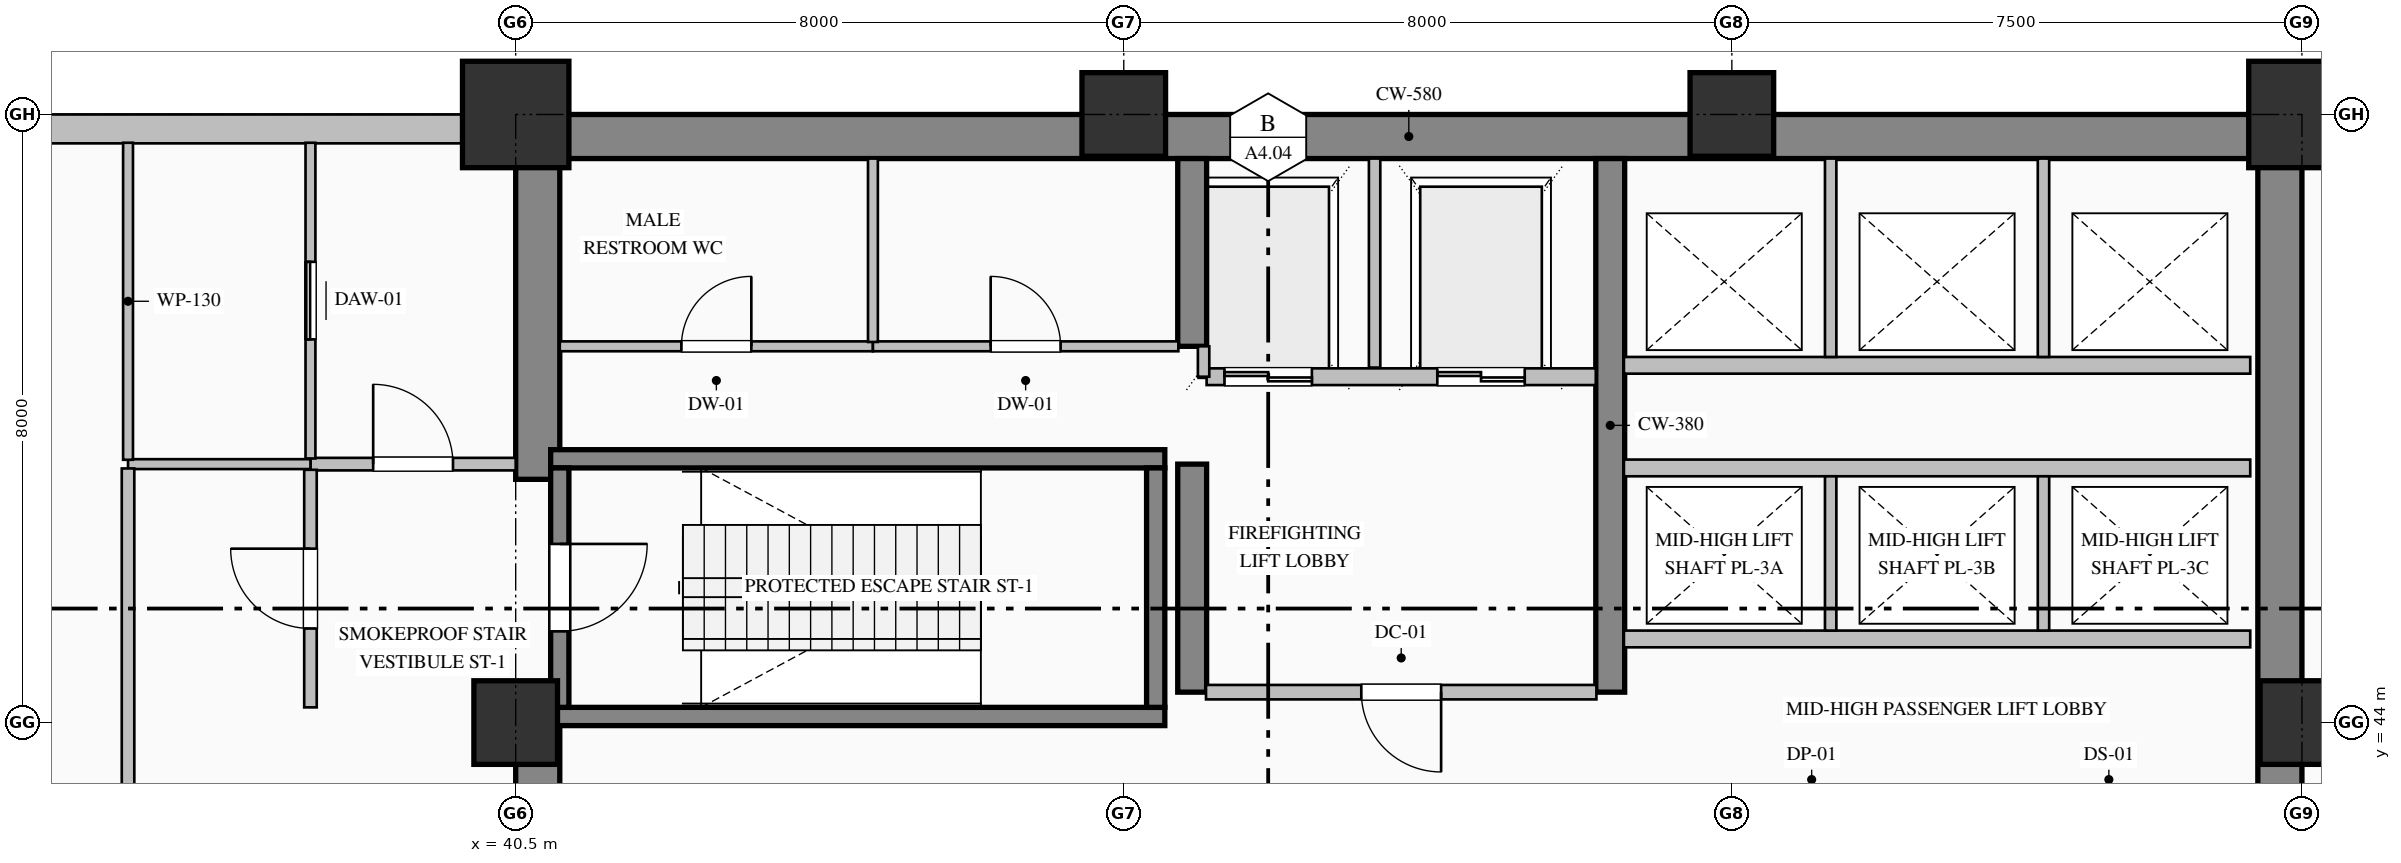
"""IFC4 building model, lengths in metres.
Left out: names, types, materials, properties, quantities, classifications, styles, units other than length and angle.
Written with IfcOpenShell. Run it as: python <this file> out.ifc"""

import sys

from ifc_helpers import new_model, si_unit, direction, frame, frame_2d, origin, origin_2d, place, context, subcontext, project, spatial, rectangle, hollow_rectangle, extrude, element, fill, save


model = new_model("IFC4")
c1 = context("Model", 3, precision=1e-05, world=origin(), true_north=direction((0.0, 1.0)))
c2 = subcontext(c1, "Body", "Model", "MODEL_VIEW")
j1 = project(units=[si_unit("LENGTHUNIT", "METRE"), si_unit("PLANEANGLEUNIT", "RADIAN")], contexts=[c1])
p1 = place(None, origin())
s1 = spatial("IfcSite", under=j1, at=p1, CompositionType="ELEMENT")
p2 = place(p1, origin())
s2 = spatial("IfcBuilding", under=s1, at=p2, CompositionType="ELEMENT")
p3 = place(p2, frame((0.0, 0.0, 17.4)))
s3 = spatial("IfcBuildingStorey", under=s2, at=p3, CompositionType="ELEMENT", Elevation=17.4)
p4 = place(p3, frame((40.5, 51.71, 0.0), z_axis=(0.0, 0.0, 1.0), x_axis=(1.0, 0.0, 0.0)))
e1 = element("IfcWall", 1, at=p4, inside=s3, PredefinedType="SHEAR", context=c2, shape_type="SweptSolid", body=[
    extrude(rectangle(XDim=23.5, YDim=0.58, at=frame_2d((11.75, 0.0))), origin(), (0.0, 0.0, 1.0), 5.14),
])
p5 = place(p3, frame((63.71, 36.32, 0.0), z_axis=(0.0, 0.0, 1.0), x_axis=(0.0, 1.0, 0.0)))
e2 = element("IfcWall", 2, at=p5, inside=s3, PredefinedType="SHEAR", context=c2, shape_type="SweptSolid", body=[
    extrude(rectangle(XDim=15.1, YDim=0.58, at=frame_2d((7.55, 0.0))), origin(), (0.0, 0.0, 1.0), 5.14),
])
p6 = place(p3, frame((40.79, 36.58, 0.0), z_axis=(0.0, 0.0, 1.0), x_axis=(0.0, 1.0, 0.0)))
e3 = element("IfcWall", 3, at=p6, inside=s3, PredefinedType="SHEAR", context=c2, shape_type="SweptSolid", body=[
    extrude(rectangle(XDim=7.82, YDim=0.58, at=frame_2d((3.91, 0.0))), origin(), (0.0, 0.0, 1.0), 5.14),
])
p7 = place(p3, frame((40.79, 47.2, 0.0), z_axis=(0.0, 0.0, 1.0), x_axis=(0.0, 1.0, 0.0)))
e4 = element("IfcWall", 4, at=p7, inside=s3, PredefinedType="SHEAR", context=c2, shape_type="SweptSolid", body=[
    extrude(rectangle(XDim=4.22, YDim=0.58, at=frame_2d((2.11, 0.0))), origin(), (0.0, 0.0, 1.0), 5.14),
])
p8 = place(p3, frame((49.4, 44.4, 0.0), z_axis=(0.0, 0.0, 1.0), x_axis=(0.0, 1.0, 0.0)))
e5 = element("IfcWall", 5, at=p8, inside=s3, PredefinedType="SHEAR", context=c2, shape_type="SweptSolid", body=[
    extrude(rectangle(XDim=3.0, YDim=0.38, at=frame_2d((1.5, 0.0))), origin(), (0.0, 0.0, 1.0), 5.14),
])
p9 = place(p3, frame((49.4, 48.95, 0.0), z_axis=(0.0, 0.0, 1.0), x_axis=(0.0, 1.0, 0.0)))
e6 = element("IfcWall", 6, at=p9, inside=s3, PredefinedType="SHEAR", context=c2, shape_type="SweptSolid", body=[
    extrude(rectangle(XDim=2.47, YDim=0.38, at=frame_2d((1.235, 0.0))), origin(), (0.0, 0.0, 1.0), 5.14),
])
p10 = place(p3, frame((54.9, 44.4, 0.0), z_axis=(0.0, 0.0, 1.0), x_axis=(0.0, 1.0, 0.0)))
e7 = element("IfcWall", 7, at=p10, inside=s3, PredefinedType="SHEAR", context=c2, shape_type="SweptSolid", body=[
    extrude(rectangle(XDim=7.02, YDim=0.38, at=frame_2d((3.51, 0.0))), origin(), (0.0, 0.0, 1.0), 5.14),
])
p11 = place(p3, frame((40.5, 44.0, 0.0), z_axis=(0.0, 0.0, 1.0), x_axis=(1.0, 0.0, 0.0)))
e8 = element("IfcColumn", 8, at=p11, inside=s3, PredefinedType="COLUMN", context=c2, shape_type="SweptSolid", body=[
    extrude(rectangle(XDim=1.1, YDim=1.1, at=origin_2d()), origin(), (0.0, 0.0, 1.0), 5.4),
])
p12 = place(p3, frame((40.5, 52.0, 0.0), z_axis=(0.0, 0.0, 1.0), x_axis=(1.0, 0.0, 0.0)))
e9 = element("IfcColumn", 9, at=p12, inside=s3, PredefinedType="COLUMN", context=c2, shape_type="SweptSolid", body=[
    extrude(hollow_rectangle(XDim=1.4, YDim=1.4, WallThickness=0.05, at=origin_2d()), origin(), (0.0, 0.0, 1.0), 5.4),
])
for number, where, z_axis, x_axis in (
    (10, (48.5, 52.0, 0.0), (0.0, 0.0, 1.0), (1.0, 0.0, 0.0)),
    (11, (56.5, 52.0, 0.0), (0.0, 0.0, 1.0), (1.0, 0.0, 0.0)),
):
    element("IfcColumn", number, at=place(p3, frame(where, z_axis=z_axis, x_axis=x_axis)), inside=s3, PredefinedType="COLUMN", context=c2, shape_type="SweptSolid", body=[
        extrude(hollow_rectangle(XDim=1.1, YDim=1.1, WallThickness=0.04, at=origin_2d()), origin(), (0.0, 0.0, 1.0), 5.4),
    ])
p13 = place(p3, frame((64.0, 44.0, 0.0), z_axis=(0.0, 0.0, 1.0), x_axis=(1.0, 0.0, 0.0)))
e12 = element("IfcColumn", 12, at=p13, inside=s3, PredefinedType="COLUMN", context=c2, shape_type="SweptSolid", body=[
    extrude(rectangle(XDim=1.1, YDim=1.1, at=origin_2d()), origin(), (0.0, 0.0, 1.0), 5.4),
])
p14 = place(p3, frame((64.0, 52.0, 0.0), z_axis=(0.0, 0.0, 1.0), x_axis=(1.0, 0.0, 0.0)))
e13 = element("IfcColumn", 13, at=p14, inside=s3, PredefinedType="COLUMN", context=c2, shape_type="SweptSolid", body=[
    extrude(hollow_rectangle(XDim=1.4, YDim=1.4, WallThickness=0.05, at=origin_2d()), origin(), (0.0, 0.0, 1.0), 5.4),
])
p15 = place(p3, frame((63.98, 51.81, 0.0), z_axis=(0.0, 0.0, 1.0), x_axis=(1.0, 0.0, 0.0)))
e14 = element("IfcWall", 14, at=p15, inside=s3, PredefinedType="SOLIDWALL", context=c2, shape_type="SweptSolid", body=[
    extrude(rectangle(XDim=4.02, YDim=0.38, at=frame_2d((2.01, 0.0))), origin(), (0.0, 0.0, 1.0), 5.14),
])
p16 = place(p3, frame((4.0, 51.81, 0.0), z_axis=(0.0, 0.0, 1.0), x_axis=(1.0, 0.0, 0.0)))
e15 = element("IfcWall", 15, at=p16, inside=s3, PredefinedType="SOLIDWALL", context=c2, shape_type="SweptSolid", body=[
    extrude(rectangle(XDim=36.52, YDim=0.38, at=frame_2d((18.26, 0.0))), origin(), (0.0, 0.0, 1.0), 4.64),
])
p17 = place(p16, frame((16.7, 0.0, 0.85)))
e16 = element("IfcOpeningElement", 16, at=p17, cuts=e15, PredefinedType="OPENING", context=c2, shape_type="SweptSolid", body=[
    extrude(rectangle(XDim=2.6, YDim=3.1, at=frame_2d((1.3, 1.55))), frame((0.0, 0.2, 0.0), z_axis=(0.0, -1.0, 0.0), x_axis=(1.0, 0.0, 0.0)), (0.0, 0.0, 1.0), 0.4),
])
p18 = place(p16, frame((24.1, 0.0, 0.9)))
e17 = element("IfcOpeningElement", 17, at=p18, cuts=e15, PredefinedType="OPENING", context=c2, shape_type="SweptSolid", body=[
    extrude(rectangle(XDim=2.2, YDim=2.65, at=frame_2d((1.1, 1.325))), frame((0.0, 0.2, 0.0), z_axis=(0.0, -1.0, 0.0), x_axis=(1.0, 0.0, 0.0)), (0.0, 0.0, 1.0), 0.4),
])
for number, where, z_axis, x_axis in (
    (18, (40.96, 47.47, 0.0), (0.0, 0.0, 1.0), (1.0, 0.0, 0.0)),
    (19, (49.04, 44.08, 0.0), (0.0, 0.0, 1.0), (-1.0, 0.0, 0.0)),
):
    element("IfcWall", number, at=place(p3, frame(where, z_axis=z_axis, x_axis=x_axis)), inside=s3, PredefinedType="SOLIDWALL", context=c2, shape_type="SweptSolid", body=[
        extrude(rectangle(XDim=8.08, YDim=0.24, at=frame_2d((4.04, 0.0))), origin(), (0.0, 0.0, 1.0), 5.4),
    ])
p19 = place(p3, frame((41.08, 47.35, 0.0), z_axis=(0.0, 0.0, 1.0), x_axis=(0.0, -1.0, 0.0)))
e20 = element("IfcWall", 20, at=p19, inside=s3, PredefinedType="SOLIDWALL", context=c2, shape_type="SweptSolid", body=[
    extrude(rectangle(XDim=3.15, YDim=0.24, at=frame_2d((1.575, 0.0))), origin(), (0.0, 0.0, 1.0), 5.4),
])
p20 = place(p19, frame((1.0, 0.0, 0.0)))
e21 = element("IfcOpeningElement", 21, at=p20, cuts=e20, PredefinedType="OPENING", context=c2, shape_type="SweptSolid", body=[
    extrude(rectangle(XDim=1.15, YDim=2.2, at=frame_2d((0.575, 1.1))), frame((0.0, 0.13, 0.0), z_axis=(0.0, -1.0, 0.0), x_axis=(1.0, 0.0, 0.0)), (0.0, 0.0, 1.0), 0.26),
])
p21 = place(p3, frame((48.92, 44.2, 0.0), z_axis=(0.0, 0.0, 1.0), x_axis=(0.0, 1.0, 0.0)))
e22 = element("IfcWall", 22, at=p21, inside=s3, PredefinedType="SOLIDWALL", context=c2, shape_type="SweptSolid", body=[
    extrude(rectangle(XDim=3.15, YDim=0.24, at=frame_2d((1.575, 0.0))), origin(), (0.0, 0.0, 1.0), 5.4),
])
p22 = place(p3, frame((54.71, 48.55, 0.0), z_axis=(0.0, 0.0, 1.0), x_axis=(-1.0, 0.0, 0.0)))
e23 = element("IfcWall", 23, at=p22, inside=s3, PredefinedType="PARTITIONING", context=c2, shape_type="SweptSolid", body=[
    extrude(rectangle(XDim=5.12, YDim=0.22, at=frame_2d((2.56, 0.0))), origin(), (0.0, 0.0, 1.0), 5.14),
])
p23 = place(p22, frame((3.735, 0.0, 0.0)))
e24 = element("IfcOpeningElement", 24, at=p23, cuts=e23, PredefinedType="OPENING", context=c2, shape_type="SweptSolid", body=[
    extrude(rectangle(XDim=1.15, YDim=2.2, at=frame_2d((0.575, 1.1))), frame((0.0, 0.12, 0.0), z_axis=(0.0, -1.0, 0.0), x_axis=(1.0, 0.0, 0.0)), (0.0, 0.0, 1.0), 0.24),
])
p24 = place(p22, frame((0.935, 0.0, 0.0)))
e25 = element("IfcOpeningElement", 25, at=p24, cuts=e23, PredefinedType="OPENING", context=c2, shape_type="SweptSolid", body=[
    extrude(rectangle(XDim=1.15, YDim=2.2, at=frame_2d((0.575, 1.1))), frame((0.0, 0.12, 0.0), z_axis=(0.0, -1.0, 0.0), x_axis=(1.0, 0.0, 0.0)), (0.0, 0.0, 1.0), 0.24),
])
p25 = place(p3, frame((51.8, 48.67, 0.0), z_axis=(0.0, 0.0, 1.0), x_axis=(0.0, 1.0, 0.0)))
e26 = element("IfcWall", 26, at=p25, inside=s3, PredefinedType="PARTITIONING", context=c2, shape_type="SweptSolid", body=[
    extrude(rectangle(XDim=2.75, YDim=0.15, at=frame_2d((1.375, 0.0))), origin(), (0.0, 0.0, 1.0), 5.14),
])
p26 = place(p3, frame((49.55, 48.55, 0.0), z_axis=(0.0, 0.0, 1.0), x_axis=(0.0, 1.0, 0.0)))
e27 = element("IfcWall", 27, at=p26, inside=s3, PredefinedType="PARTITIONING", context=c2, shape_type="SweptSolid", body=[
    extrude(rectangle(XDim=0.4, YDim=0.15, at=frame_2d((0.2, 0.0))), origin(), (0.0, 0.0, 1.0), 5.14),
])
for number, where, z_axis, x_axis in (
    (28, (63.32, 45.1, 0.0), (0.0, 0.0, 1.0), (-1.0, 0.0, 0.0)),
    (29, (55.08, 47.35, 0.0), (0.0, 0.0, 1.0), (1.0, 0.0, 0.0)),
):
    element("IfcWall", number, at=place(p3, frame(where, z_axis=z_axis, x_axis=x_axis)), inside=s3, PredefinedType="PARTITIONING", context=c2, shape_type="SweptSolid", body=[
        extrude(rectangle(XDim=8.24, YDim=0.22, at=frame_2d((4.12, 0.0))), origin(), (0.0, 0.0, 1.0), 5.14),
    ])
for number, where, z_axis, x_axis in (
    (30, (57.8, 45.21, 0.0), (0.0, 0.0, 1.0), (0.0, 1.0, 0.0)),
    (31, (60.6, 45.21, 0.0), (0.0, 0.0, 1.0), (0.0, 1.0, 0.0)),
):
    element("IfcWall", number, at=place(p3, frame(where, z_axis=z_axis, x_axis=x_axis)), inside=s3, PredefinedType="PARTITIONING", context=c2, shape_type="SweptSolid", body=[
        extrude(rectangle(XDim=2.03, YDim=0.15, at=frame_2d((1.015, 0.0))), origin(), (0.0, 0.0, 1.0), 5.14),
    ])
p27 = place(p3, frame((63.32, 48.7, 0.0), z_axis=(0.0, 0.0, 1.0), x_axis=(-1.0, 0.0, 0.0)))
e32 = element("IfcWall", 32, at=p27, inside=s3, PredefinedType="PARTITIONING", context=c2, shape_type="SweptSolid", body=[
    extrude(rectangle(XDim=8.24, YDim=0.22, at=frame_2d((4.12, 0.0))), origin(), (0.0, 0.0, 1.0), 5.14),
])
for number, where, z_axis, x_axis in (
    (33, (57.8, 48.81, 0.0), (0.0, 0.0, 1.0), (0.0, 1.0, 0.0)),
    (34, (60.6, 48.81, 0.0), (0.0, 0.0, 1.0), (0.0, 1.0, 0.0)),
):
    element("IfcWall", number, at=place(p3, frame(where, z_axis=z_axis, x_axis=x_axis)), inside=s3, PredefinedType="PARTITIONING", context=c2, shape_type="SweptSolid", body=[
        extrude(rectangle(XDim=2.61, YDim=0.15, at=frame_2d((1.305, 0.0))), origin(), (0.0, 0.0, 1.0), 5.14),
    ])
p28 = place(p3, frame((37.8, 47.4, 0.0), z_axis=(0.0, 0.0, 1.0), x_axis=(1.0, 0.0, 0.0)))
e35 = element("IfcWall", 35, at=p28, inside=s3, PredefinedType="PARTITIONING", context=c2, shape_type="SweptSolid", body=[
    extrude(rectangle(XDim=2.7, YDim=0.165, at=frame_2d((1.35, 0.0))), origin(), (0.0, 0.0, 1.0), 5.14),
])
p29 = place(p28, frame((0.825, 0.0, 0.0)))
e36 = element("IfcOpeningElement", 36, at=p29, cuts=e35, PredefinedType="OPENING", context=c2, shape_type="SweptSolid", body=[
    extrude(rectangle(XDim=1.05, YDim=2.15, at=frame_2d((0.525, 1.075))), frame((0.0, 0.093, 0.0), z_axis=(0.0, -1.0, 0.0), x_axis=(1.0, 0.0, 0.0)), (0.0, 0.0, 1.0), 0.185),
])
p30 = place(p3, frame((37.8, 44.2, 0.0), z_axis=(0.0, 0.0, 1.0), x_axis=(0.0, 1.0, 0.0)))
e37 = element("IfcWall", 37, at=p30, inside=s3, PredefinedType="PARTITIONING", context=c2, shape_type="SweptSolid", body=[
    extrude(rectangle(XDim=3.125, YDim=0.165, at=frame_2d((1.563, 0.0))), origin(), (0.0, 0.0, 1.0), 5.14),
])
p31 = place(p30, frame((1.038, 0.0, 0.0)))
e38 = element("IfcOpeningElement", 38, at=p31, cuts=e37, PredefinedType="OPENING", context=c2, shape_type="SweptSolid", body=[
    extrude(rectangle(XDim=1.05, YDim=2.15, at=frame_2d((0.525, 1.075))), frame((0.0, 0.093, 0.0), z_axis=(0.0, -1.0, 0.0), x_axis=(1.0, 0.0, 0.0)), (0.0, 0.0, 1.0), 0.185),
])
p32 = place(p3, frame((37.8, 47.475, 0.0), z_axis=(0.0, 0.0, 1.0), x_axis=(0.0, 1.0, 0.0)))
e39 = element("IfcWall", 39, at=p32, inside=s3, PredefinedType="PARTITIONING", context=c2, shape_type="SweptSolid", body=[
    extrude(rectangle(XDim=4.153, YDim=0.13, at=frame_2d((2.077, 0.0))), origin(), (0.0, 0.0, 1.0), 5.14),
])
p33 = place(p32, frame((1.567, 0.0, 0.0)))
e40 = element("IfcOpeningElement", 40, at=p33, cuts=e39, PredefinedType="OPENING", context=c2, shape_type="SweptSolid", body=[
    extrude(rectangle(XDim=1.02, YDim=2.15, at=frame_2d((0.51, 1.075))), frame((0.0, 0.075, 0.0), z_axis=(0.0, -1.0, 0.0), x_axis=(1.0, 0.0, 0.0)), (0.0, 0.0, 1.0), 0.15),
])
p34 = place(p3, frame((37.8, 47.4, 0.0), z_axis=(0.0, 0.0, 1.0), x_axis=(-1.0, 0.0, 0.0)))
e41 = element("IfcWall", 41, at=p34, inside=s3, PredefinedType="PARTITIONING", context=c2, shape_type="SweptSolid", body=[
    extrude(rectangle(XDim=2.4, YDim=0.13, at=frame_2d((1.2, 0.0))), origin(), (0.0, 0.0, 1.0), 5.14),
])
p35 = place(p3, frame((35.4, 47.457, 0.0), z_axis=(0.0, 0.0, 1.0), x_axis=(0.0, 1.0, 0.0)))
e42 = element("IfcWall", 42, at=p35, inside=s3, PredefinedType="PARTITIONING", context=c2, shape_type="SweptSolid", body=[
    extrude(rectangle(XDim=4.171, YDim=0.13, at=frame_2d((2.085, 0.0))), origin(), (0.0, 0.0, 1.0), 5.14),
])
p36 = place(p3, frame((41.08, 48.95, 0.0), z_axis=(0.0, 0.0, 1.0), x_axis=(1.0, 0.0, 0.0)))
e43 = element("IfcWall", 43, at=p36, inside=s3, PredefinedType="PARTITIONING", context=c2, shape_type="SweptSolid", body=[
    extrude(rectangle(XDim=4.12, YDim=0.13, at=frame_2d((2.06, 0.0))), origin(), (0.0, 0.0, 1.0), 5.14),
])
p37 = place(p36, frame((1.6, 0.0, 0.0)))
e44 = element("IfcOpeningElement", 44, at=p37, cuts=e43, PredefinedType="OPENING", context=c2, shape_type="SweptSolid", body=[
    extrude(rectangle(XDim=0.92, YDim=2.15, at=frame_2d((0.46, 1.075))), frame((0.0, 0.075, 0.0), z_axis=(0.0, -1.0, 0.0), x_axis=(1.0, 0.0, 0.0)), (0.0, 0.0, 1.0), 0.15),
])
p38 = place(p3, frame((45.2, 48.95, 0.0), z_axis=(0.0, 0.0, 1.0), x_axis=(1.0, 0.0, 0.0)))
e45 = element("IfcWall", 45, at=p38, inside=s3, PredefinedType="PARTITIONING", context=c2, shape_type="SweptSolid", body=[
    extrude(rectangle(XDim=4.018, YDim=0.13, at=frame_2d((2.009, 0.0))), origin(), (0.0, 0.0, 1.0), 5.14),
])
p39 = place(p38, frame((1.549, 0.0, 0.0)))
e46 = element("IfcOpeningElement", 46, at=p39, cuts=e45, PredefinedType="OPENING", context=c2, shape_type="SweptSolid", body=[
    extrude(rectangle(XDim=0.92, YDim=2.15, at=frame_2d((0.46, 1.075))), frame((0.0, 0.075, 0.0), z_axis=(0.0, -1.0, 0.0), x_axis=(1.0, 0.0, 0.0)), (0.0, 0.0, 1.0), 0.15),
])
p40 = place(p3, frame((54.718, 44.4, 0.0), z_axis=(0.0, 0.0, 1.0), x_axis=(-1.0, 0.0, 0.0)))
e47 = element("IfcWall", 47, at=p40, inside=s3, PredefinedType="PARTITIONING", context=c2, shape_type="SweptSolid", body=[
    extrude(rectangle(XDim=5.136, YDim=0.19, at=frame_2d((2.568, 0.0))), origin(), (0.0, 0.0, 1.0), 5.14),
])
p41 = place(p40, frame((2.043, 0.0, 0.0)))
e48 = element("IfcOpeningElement", 48, at=p41, cuts=e47, PredefinedType="OPENING", context=c2, shape_type="SweptSolid", body=[
    extrude(rectangle(XDim=1.05, YDim=2.15, at=frame_2d((0.525, 1.075))), frame((0.0, 0.105, 0.0), z_axis=(0.0, -1.0, 0.0), x_axis=(1.0, 0.0, 0.0)), (0.0, 0.0, 1.0), 0.21),
])
p42 = place(p3, frame((45.2, 51.42, 0.0), z_axis=(0.0, 0.0, 1.0), x_axis=(0.0, -1.0, 0.0)))
e49 = element("IfcWall", 49, at=p42, inside=s3, PredefinedType="PARTITIONING", context=c2, shape_type="SweptSolid", body=[
    extrude(rectangle(XDim=2.413, YDim=0.13, at=frame_2d((1.207, 0.0))), origin(), (0.0, 0.0, 1.0), 5.14),
])
p43 = place(p3, frame((35.4, 34.074, 0.0), z_axis=(0.0, 0.0, 1.0), x_axis=(0.0, 1.0, 0.0)))
e50 = element("IfcWall", 50, at=p43, inside=s3, PredefinedType="PARTITIONING", context=c2, shape_type="SweptSolid", body=[
    extrude(rectangle(XDim=13.269, YDim=0.165, at=frame_2d((6.634, 0.0))), origin(), (0.0, 0.0, 1.0), 5.14),
])
p44 = place(p20, origin())
e51 = element("IfcDoor", 51, at=p44, inside=s3, OperationType="SINGLE_SWING_LEFT", PredefinedType="DOOR", context=c2, shape_type="SweptSolid", body=[
    extrude(rectangle(XDim=1.15, YDim=2.2, at=frame_2d((0.575, 1.1))), frame((0.0, 0.025, 0.0), z_axis=(0.0, -1.0, 0.0), x_axis=(1.0, 0.0, 0.0)), (0.0, 0.0, 1.0), 0.05),
])
fill(e21, e51)
p45 = place(p23, origin())
e52 = element("IfcDoor", 52, at=p45, inside=s3, OperationType="DOUBLE_DOOR_SLIDING", PredefinedType="DOOR", context=c2, shape_type="SweptSolid", body=[
    extrude(rectangle(XDim=1.15, YDim=2.2, at=frame_2d((0.575, 1.1))), frame((0.0, 0.025, 0.0), z_axis=(0.0, -1.0, 0.0), x_axis=(1.0, 0.0, 0.0)), (0.0, 0.0, 1.0), 0.05),
])
fill(e24, e52)
p46 = place(p24, origin())
e53 = element("IfcDoor", 53, at=p46, inside=s3, OperationType="DOUBLE_DOOR_SLIDING", PredefinedType="DOOR", context=c2, shape_type="SweptSolid", body=[
    extrude(rectangle(XDim=1.15, YDim=2.2, at=frame_2d((0.575, 1.1))), frame((0.0, 0.025, 0.0), z_axis=(0.0, -1.0, 0.0), x_axis=(1.0, 0.0, 0.0)), (0.0, 0.0, 1.0), 0.05),
])
fill(e25, e53)
p47 = place(p41, origin())
e54 = element("IfcDoor", 54, at=p47, inside=s3, OperationType="SINGLE_SWING_LEFT", PredefinedType="DOOR", context=c2, shape_type="SweptSolid", body=[
    extrude(rectangle(XDim=1.05, YDim=2.15, at=frame_2d((0.525, 1.075))), frame((0.0, 0.025, 0.0), z_axis=(0.0, -1.0, 0.0), x_axis=(1.0, 0.0, 0.0)), (0.0, 0.0, 1.0), 0.05),
])
fill(e48, e54)
p48 = place(p31, origin())
e55 = element("IfcDoor", 55, at=p48, inside=s3, OperationType="SINGLE_SWING_RIGHT", PredefinedType="DOOR", context=c2, shape_type="SweptSolid", body=[
    extrude(rectangle(XDim=1.05, YDim=2.15, at=frame_2d((0.525, 1.075))), frame((0.0, 0.025, 0.0), z_axis=(0.0, -1.0, 0.0), x_axis=(1.0, 0.0, 0.0)), (0.0, 0.0, 1.0), 0.05),
])
fill(e38, e55)
p49 = place(p29, origin())
e56 = element("IfcDoor", 56, at=p49, inside=s3, OperationType="SINGLE_SWING_LEFT", PredefinedType="DOOR", context=c2, shape_type="SweptSolid", body=[
    extrude(rectangle(XDim=1.05, YDim=2.15, at=frame_2d((0.525, 1.075))), frame((0.0, 0.025, 0.0), z_axis=(0.0, -1.0, 0.0), x_axis=(1.0, 0.0, 0.0)), (0.0, 0.0, 1.0), 0.05),
])
fill(e36, e56)
p50 = place(p33, origin())
e57 = element("IfcDoor", 57, at=p50, inside=s3, OperationType="SLIDING_TO_LEFT", PredefinedType="DOOR", context=c2, shape_type="SweptSolid", body=[
    extrude(rectangle(XDim=1.02, YDim=2.15, at=frame_2d((0.51, 1.075))), frame((0.0, 0.025, 0.0), z_axis=(0.0, -1.0, 0.0), x_axis=(1.0, 0.0, 0.0)), (0.0, 0.0, 1.0), 0.05),
])
fill(e40, e57)
p51 = place(p37, origin())
e58 = element("IfcDoor", 58, at=p51, inside=s3, OperationType="SINGLE_SWING_RIGHT", PredefinedType="DOOR", context=c2, shape_type="SweptSolid", body=[
    extrude(rectangle(XDim=0.92, YDim=2.15, at=frame_2d((0.46, 1.075))), frame((0.0, 0.025, 0.0), z_axis=(0.0, -1.0, 0.0), x_axis=(1.0, 0.0, 0.0)), (0.0, 0.0, 1.0), 0.05),
])
fill(e44, e58)
p52 = place(p39, origin())
e59 = element("IfcDoor", 59, at=p52, inside=s3, OperationType="SINGLE_SWING_LEFT", PredefinedType="DOOR", context=c2, shape_type="SweptSolid", body=[
    extrude(rectangle(XDim=0.92, YDim=2.15, at=frame_2d((0.46, 1.075))), frame((0.0, 0.025, 0.0), z_axis=(0.0, -1.0, 0.0), x_axis=(1.0, 0.0, 0.0)), (0.0, 0.0, 1.0), 0.05),
])
fill(e46, e59)
save(model, sys.argv[1])
